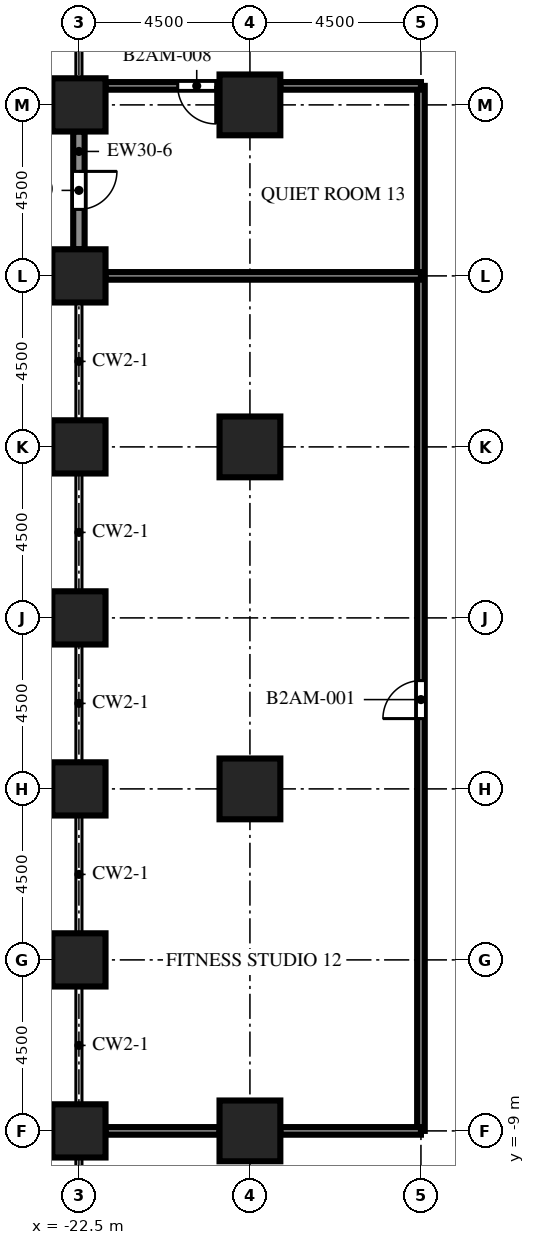
"""IFC4 building model, lengths in metres.
Left out: names, types, materials, properties, quantities, classifications, styles, units other than length and angle.
Written with IfcOpenShell. Run it as: python <this file> out.ifc"""

import sys

from ifc_helpers import new_model, si_unit, direction, frame, frame_2d, origin, origin_2d, place, context, subcontext, project, spatial, rectangle, extrude, element, fill, save


model = new_model("IFC4")
c1 = context("Model", 3, precision=1e-05, world=origin(), true_north=direction((0.0, 1.0)))
c2 = subcontext(c1, "Body", "Model", "MODEL_VIEW")
j1 = project(units=[si_unit("LENGTHUNIT", "METRE"), si_unit("PLANEANGLEUNIT", "RADIAN")], contexts=[c1])
p1 = place(None, origin())
s1 = spatial("IfcSite", under=j1, at=p1, CompositionType="ELEMENT")
p2 = place(p1, origin())
s2 = spatial("IfcBuilding", under=s1, at=p2, CompositionType="ELEMENT")
p3 = place(p2, frame((0.0, 0.0, 70.6)))
s3 = spatial("IfcBuildingStorey", under=s2, at=p3, CompositionType="ELEMENT", Elevation=70.6)
for number, where, z_axis, x_axis in (
    (1, (-22.5, -9.0, 0.0), (0.0, 0.0, 1.0), (1.0, 0.0, 0.0)),
    (2, (-22.5, -4.5, 0.0), (0.0, 0.0, 1.0), (1.0, 0.0, 0.0)),
    (3, (-22.5, 0.0, 0.0), (0.0, 0.0, 1.0), (1.0, 0.0, 0.0)),
    (4, (-22.5, 4.5, 0.0), (0.0, 0.0, 1.0), (1.0, 0.0, 0.0)),
    (5, (-22.5, 9.0, 0.0), (0.0, 0.0, 1.0), (1.0, 0.0, 0.0)),
    (6, (-22.5, 13.5, 0.0), (0.0, 0.0, 1.0), (1.0, 0.0, 0.0)),
    (7, (-22.5, 18.0, 0.0), (0.0, 0.0, 1.0), (1.0, 0.0, 0.0)),
):
    element("IfcColumn", number, at=place(p3, frame(where, z_axis=z_axis, x_axis=x_axis)), inside=s3, PredefinedType="COLUMN", context=c2, shape_type="SweptSolid", body=[
        extrude(rectangle(XDim=1.4, YDim=1.4, at=origin_2d()), origin(), (0.0, 0.0, 1.0), 6.0),
    ])
for number, where, z_axis, x_axis in (
    (8, (-18.0, -9.0, 0.0), (0.0, 0.0, 1.0), (1.0, 0.0, 0.0)),
    (9, (-18.0, 0.0, 0.0), (0.0, 0.0, 1.0), (1.0, 0.0, 0.0)),
    (10, (-18.0, 9.0, 0.0), (0.0, 0.0, 1.0), (1.0, 0.0, 0.0)),
    (11, (-18.0, 18.0, 0.0), (0.0, 0.0, 1.0), (1.0, 0.0, 0.0)),
):
    element("IfcColumn", number, at=place(p3, frame(where, z_axis=z_axis, x_axis=x_axis)), inside=s3, PredefinedType="COLUMN", context=c2, shape_type="SweptSolid", body=[
        extrude(rectangle(XDim=1.6, YDim=1.6, at=origin_2d()), origin(), (0.0, 0.0, 1.0), 6.0),
    ])
p4 = place(p3, frame((-22.5, 14.2, 0.0), z_axis=(0.0, 0.0, 1.0), x_axis=(0.0, 1.0, 0.0)))
e12 = element("IfcWall", 12, at=p4, inside=s3, PredefinedType="SOLIDWALL", context=c2, shape_type="SweptSolid", body=[
    extrude(rectangle(XDim=3.1, YDim=0.3, at=frame_2d((1.55, 0.0))), origin(), (0.0, 0.0, 1.0), 4.5),
])
p5 = place(p4, frame((1.05, 0.0, 0.0)))
e13 = element("IfcOpeningElement", 13, at=p5, cuts=e12, PredefinedType="OPENING", context=c2, shape_type="SweptSolid", body=[
    extrude(rectangle(XDim=1.0, YDim=2.2, at=frame_2d((0.5, 1.1))), frame((0.0, 0.16, 0.0), z_axis=(0.0, -1.0, 0.0), x_axis=(1.0, 0.0, 0.0)), (0.0, 0.0, 1.0), 0.32),
])
p6 = place(p3, frame((-13.5, -9.0, 0.0), z_axis=(0.0, 0.0, 1.0), x_axis=(0.0, 1.0, 0.0)))
e14 = element("IfcWall", 14, at=p6, inside=s3, PredefinedType="PARTITIONING", context=c2, shape_type="SweptSolid", body=[
    extrude(rectangle(XDim=27.5, YDim=0.2, at=frame_2d((13.75, 0.0))), origin(), (0.0, 0.0, 1.0), 5.4),
])
p7 = place(p6, frame((10.85, 0.0, 0.0)))
e15 = element("IfcOpeningElement", 15, at=p7, cuts=e14, PredefinedType="OPENING", context=c2, shape_type="SweptSolid", body=[
    extrude(rectangle(XDim=1.0, YDim=2.1, at=frame_2d((0.5, 1.05))), frame((0.0, 0.11, 0.0), z_axis=(0.0, -1.0, 0.0), x_axis=(1.0, 0.0, 0.0)), (0.0, 0.0, 1.0), 0.22),
])
p8 = place(p3, frame((-21.8, -9.0, 0.0), z_axis=(0.0, 0.0, 1.0), x_axis=(1.0, 0.0, 0.0)))
e16 = element("IfcWall", 16, at=p8, inside=s3, PredefinedType="PARTITIONING", context=c2, shape_type="SweptSolid", body=[
    extrude(rectangle(XDim=3.0, YDim=0.2, at=frame_2d((1.5, 0.0))), origin(), (0.0, 0.0, 1.0), 5.4),
])
p9 = place(p3, frame((-17.2, -9.0, 0.0), z_axis=(0.0, 0.0, 1.0), x_axis=(1.0, 0.0, 0.0)))
e17 = element("IfcWall", 17, at=p9, inside=s3, PredefinedType="PARTITIONING", context=c2, shape_type="SweptSolid", body=[
    extrude(rectangle(XDim=3.7, YDim=0.2, at=frame_2d((1.85, 0.0))), origin(), (0.0, 0.0, 1.0), 5.4),
])
p10 = place(p3, frame((-21.8, 13.5, 0.0), z_axis=(0.0, 0.0, 1.0), x_axis=(1.0, 0.0, 0.0)))
e18 = element("IfcWall", 18, at=p10, inside=s3, PredefinedType="PARTITIONING", context=c2, shape_type="SweptSolid", body=[
    extrude(rectangle(XDim=8.3, YDim=0.2, at=frame_2d((4.15, 0.0))), origin(), (0.0, 0.0, 1.0), 5.4),
])
p11 = place(p3, frame((-18.8, 18.5, 0.0), z_axis=(0.0, 0.0, 1.0), x_axis=(-1.0, 0.0, 0.0)))
e19 = element("IfcWall", 19, at=p11, inside=s3, PredefinedType="PARTITIONING", context=c2, shape_type="SweptSolid", body=[
    extrude(rectangle(XDim=3.0, YDim=0.2, at=frame_2d((1.5, 0.0))), origin(), (0.0, 0.0, 1.0), 5.4),
])
p12 = place(p11, frame((0.1, 0.0, 0.0)))
e20 = element("IfcOpeningElement", 20, at=p12, cuts=e19, PredefinedType="OPENING", context=c2, shape_type="SweptSolid", body=[
    extrude(rectangle(XDim=1.0, YDim=2.1, at=frame_2d((0.5, 1.05))), frame((0.0, 0.11, 0.0), z_axis=(0.0, -1.0, 0.0), x_axis=(1.0, 0.0, 0.0)), (0.0, 0.0, 1.0), 0.22),
])
p13 = place(p3, frame((-17.2, 18.5, 0.0), z_axis=(0.0, 0.0, 1.0), x_axis=(1.0, 0.0, 0.0)))
e21 = element("IfcWall", 21, at=p13, inside=s3, PredefinedType="PARTITIONING", context=c2, shape_type="SweptSolid", body=[
    extrude(rectangle(XDim=3.7, YDim=0.2, at=frame_2d((1.85, 0.0))), origin(), (0.0, 0.0, 1.0), 5.4),
])
p14 = place(p5, origin())
e22 = element("IfcDoor", 22, at=p14, inside=s3, OperationType="SINGLE_SWING_RIGHT", PredefinedType="DOOR", context=c2, shape_type="SweptSolid", body=[
    extrude(rectangle(XDim=1.0, YDim=2.2, at=frame_2d((0.5, 1.1))), frame((0.0, 0.025, 0.0), z_axis=(0.0, -1.0, 0.0), x_axis=(1.0, 0.0, 0.0)), (0.0, 0.0, 1.0), 0.05),
])
fill(e13, e22)
p15 = place(p7, origin())
e23 = element("IfcDoor", 23, at=p15, inside=s3, OperationType="SINGLE_SWING_LEFT", PredefinedType="DOOR", context=c2, shape_type="SweptSolid", body=[
    extrude(rectangle(XDim=1.0, YDim=2.1, at=frame_2d((0.5, 1.05))), frame((0.0, 0.025, 0.0), z_axis=(0.0, -1.0, 0.0), x_axis=(1.0, 0.0, 0.0)), (0.0, 0.0, 1.0), 0.05),
])
fill(e15, e23)
p16 = place(p12, origin())
e24 = element("IfcDoor", 24, at=p16, inside=s3, OperationType="SINGLE_SWING_LEFT", PredefinedType="DOOR", context=c2, shape_type="SweptSolid", body=[
    extrude(rectangle(XDim=1.0, YDim=2.1, at=frame_2d((0.5, 1.05))), frame((0.0, 0.025, 0.0), z_axis=(0.0, -1.0, 0.0), x_axis=(1.0, 0.0, 0.0)), (0.0, 0.0, 1.0), 0.05),
])
fill(e20, e24)
save(model, sys.argv[1])
